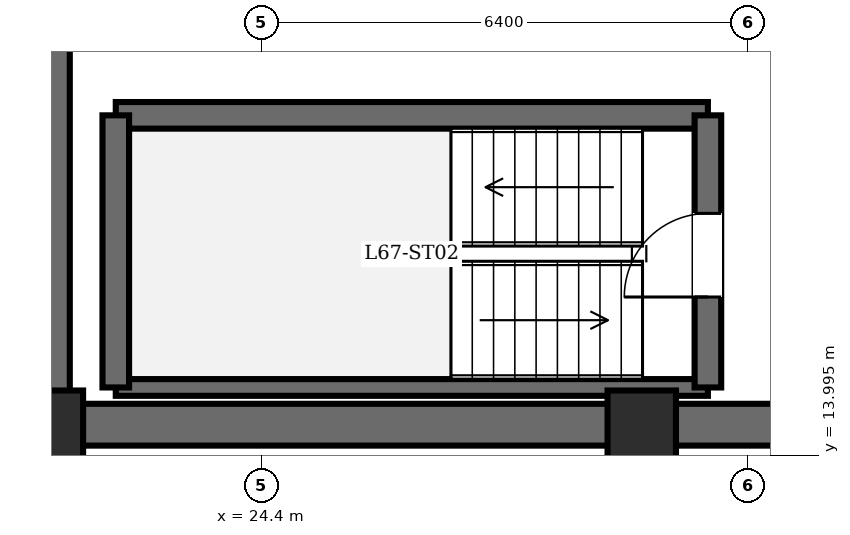
"""IFC4 building model, lengths in metres.
Left out: names, types, materials, properties, quantities, classifications, styles, units other than length and angle.
Written with IfcOpenShell. Run it as: python <this file> out.ifc"""

import sys

from ifc_helpers import new_model, si_unit, direction, frame, frame_2d, origin, origin_2d, place, context, subcontext, project, spatial, rectangle, extrude, element, fill, save


model = new_model("IFC4")
c1 = context("Model", 3, precision=1e-05, world=origin(), true_north=direction((0.0, 1.0)))
c2 = subcontext(c1, "Body", "Model", "MODEL_VIEW")
j1 = project(units=[si_unit("LENGTHUNIT", "METRE"), si_unit("PLANEANGLEUNIT", "RADIAN")], contexts=[c1])
p1 = place(None, origin())
s1 = spatial("IfcSite", under=j1, at=p1, CompositionType="ELEMENT")
p2 = place(p1, origin())
s2 = spatial("IfcBuilding", under=s1, at=p2, CompositionType="ELEMENT")
p3 = place(p2, frame((0.0, 0.0, 258.8)))
s3 = spatial("IfcBuildingStorey", under=s2, at=p3, CompositionType="ELEMENT", Elevation=258.8)
for number, where, z_axis, x_axis in (
    (1, (21.6, 14.4, 0.0), (0.0, 0.0, 1.0), (1.0, 0.0, 0.0)),
    (2, (29.4, 14.4, 0.0), (0.0, 0.0, 1.0), (1.0, 0.0, 0.0)),
):
    element("IfcColumn", number, at=place(p3, frame(where, z_axis=z_axis, x_axis=x_axis)), inside=s3, PredefinedType="COLUMN", context=c2, shape_type="SweptSolid", body=[
        extrude(rectangle(XDim=0.9, YDim=0.9, at=origin_2d()), origin(), (0.0, 0.0, 1.0), 3.65),
    ])
p4 = place(p3, frame((21.6, 14.4, 0.0), z_axis=(0.0, 0.0, 1.0), x_axis=(0.0, 1.0, 0.0)))
e3 = element("IfcWall", 3, at=p4, inside=s3, PredefinedType="SHEAR", context=c2, shape_type="SweptSolid", body=[
    extrude(rectangle(XDim=19.2, YDim=0.55, at=frame_2d((9.6, 0.0))), origin(), (0.0, 0.0, 1.0), 3.45),
])
p5 = place(p3, frame((37.2, 14.4, 0.0), z_axis=(0.0, 0.0, 1.0), x_axis=(-1.0, 0.0, 0.0)))
e4 = element("IfcWall", 4, at=p5, inside=s3, PredefinedType="SHEAR", context=c2, shape_type="SweptSolid", body=[
    extrude(rectangle(XDim=15.6, YDim=0.55, at=frame_2d((7.8, 0.0))), origin(), (0.0, 0.0, 1.0), 3.45),
])
p6 = place(p3, frame((22.48, 18.47, 0.0), z_axis=(0.0, 0.0, 1.0), x_axis=(1.0, 0.0, 0.0)))
e5 = element("IfcWall", 5, at=p6, inside=s3, PredefinedType="SOLIDWALL", context=c2, shape_type="SweptSolid", body=[
    extrude(rectangle(XDim=7.79, YDim=0.35, at=frame_2d((3.895, 0.0))), origin(), (0.0, 0.0, 1.0), 3.45),
])
p7 = place(p3, frame((22.48, 14.89, 0.0), z_axis=(0.0, 0.0, 1.0), x_axis=(1.0, 0.0, 0.0)))
e6 = element("IfcWall", 6, at=p7, inside=s3, PredefinedType="PARTITIONING", context=c2, shape_type="SweptSolid", body=[
    extrude(rectangle(XDim=7.79, YDim=0.22, at=frame_2d((3.895, 0.0))), origin(), (0.0, 0.0, 1.0), 3.45),
])
p8 = place(p3, frame((22.48, 14.89, 0.0), z_axis=(0.0, 0.0, 1.0), x_axis=(0.0, 1.0, 0.0)))
e7 = element("IfcWall", 7, at=p8, inside=s3, PredefinedType="SOLIDWALL", context=c2, shape_type="SweptSolid", body=[
    extrude(rectangle(XDim=3.58, YDim=0.35, at=frame_2d((1.79, 0.0))), origin(), (0.0, 0.0, 1.0), 3.45),
])
p9 = place(p3, frame((30.27, 14.89, 0.0), z_axis=(0.0, 0.0, 1.0), x_axis=(0.0, 1.0, 0.0)))
e8 = element("IfcWall", 8, at=p9, inside=s3, PredefinedType="SOLIDWALL", context=c2, shape_type="SweptSolid", body=[
    extrude(rectangle(XDim=3.58, YDim=0.35, at=frame_2d((1.79, 0.0))), origin(), (0.0, 0.0, 1.0), 3.45),
])
p10 = place(p9, frame((1.19, 0.0, 0.0)))
e9 = element("IfcOpeningElement", 9, at=p10, cuts=e8, PredefinedType="OPENING", context=c2, shape_type="SweptSolid", body=[
    extrude(rectangle(XDim=1.1, YDim=2.15, at=frame_2d((0.55, 1.075))), frame((0.0, 0.185, 0.0), z_axis=(0.0, -1.0, 0.0), x_axis=(1.0, 0.0, 0.0)), (0.0, 0.0, 1.0), 0.37),
])
p11 = place(p10, origin())
e10 = element("IfcDoor", 10, at=p11, inside=s3, OperationType="SINGLE_SWING_LEFT", PredefinedType="DOOR", context=c2, shape_type="SweptSolid", body=[
    extrude(rectangle(XDim=1.1, YDim=2.15, at=frame_2d((0.55, 1.075))), frame((0.0, 0.025, 0.0), z_axis=(0.0, -1.0, 0.0), x_axis=(1.0, 0.0, 0.0)), (0.0, 0.0, 1.0), 0.05),
])
fill(e9, e10)
save(model, sys.argv[1])
